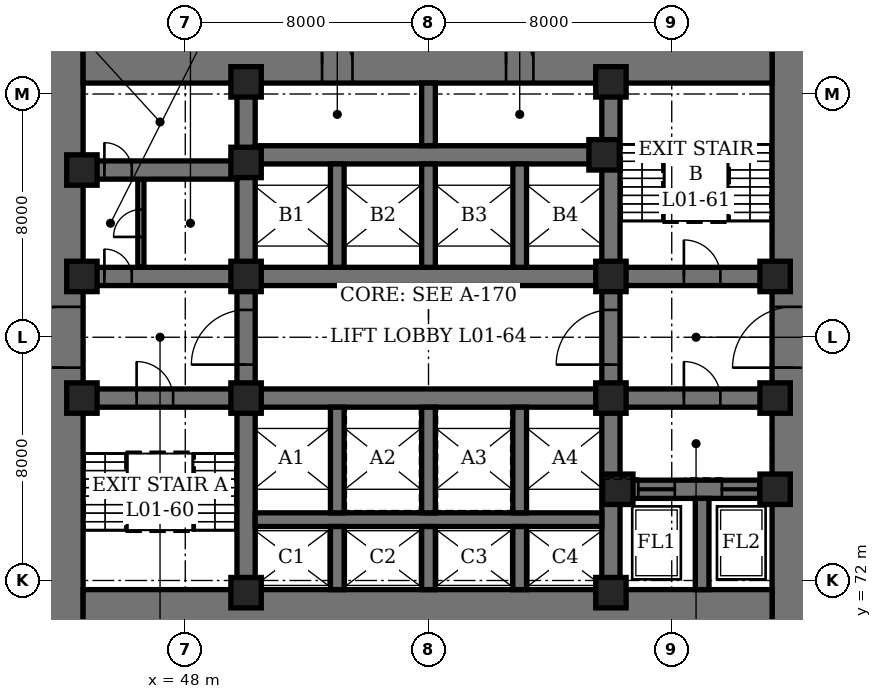
"""IFC4 building model, lengths in metres.
Left out: names, types, materials, properties, quantities, classifications, styles, units other than length and angle.
Written with IfcOpenShell. Run it as: python <this file> out.ifc"""

import sys

from ifc_helpers import new_model, si_unit, direction, frame, frame_2d, origin, origin_2d, place, context, subcontext, project, spatial, rectangle, hollow_rectangle, extrude, element, fill, save


model = new_model("IFC4")
c1 = context("Model", 3, precision=1e-05, world=origin(), true_north=direction((0.0, 1.0)))
c2 = subcontext(c1, "Body", "Model", "MODEL_VIEW")
j1 = project(units=[si_unit("LENGTHUNIT", "METRE"), si_unit("PLANEANGLEUNIT", "RADIAN")], contexts=[c1])
p1 = place(None, origin())
s1 = spatial("IfcSite", under=j1, at=p1, CompositionType="ELEMENT")
p2 = place(p1, origin())
s2 = spatial("IfcBuilding", under=s1, at=p2, CompositionType="ELEMENT")
p3 = place(p2, frame((0.0, 0.0, 4.9)))
s3 = spatial("IfcBuildingStorey", under=s2, at=p3, CompositionType="ELEMENT", Elevation=4.9)
p4 = place(p3, frame((44.0, 70.3, 0.0), z_axis=(0.0, 0.0, 1.0), x_axis=(0.0, 1.0, 0.0)))
e1 = element("IfcWall", 1, at=p4, inside=s3, PredefinedType="SHEAR", context=c2, shape_type="SweptSolid", body=[
    extrude(rectangle(XDim=19.34, YDim=1.28, at=frame_2d((9.67, 0.0))), origin(), (0.0, 0.0, 1.0), 5.0),
])
p5 = place(p4, frame((8.7, 0.0, 0.0)))
e2 = element("IfcOpeningElement", 2, at=p5, cuts=e1, PredefinedType="OPENING", context=c2, shape_type="SweptSolid", body=[
    extrude(rectangle(XDim=2.0, YDim=2.4, at=frame_2d((1.0, 1.2))), frame((0.0, 0.65, 0.0), z_axis=(0.0, -1.0, 0.0), x_axis=(1.0, 0.0, 0.0)), (0.0, 0.0, 1.0), 1.3),
])
p6 = place(p3, frame((68.0, 70.3, 0.0), z_axis=(0.0, 0.0, 1.0), x_axis=(0.0, 1.0, 0.0)))
e3 = element("IfcWall", 3, at=p6, inside=s3, PredefinedType="SHEAR", context=c2, shape_type="SweptSolid", body=[
    extrude(rectangle(XDim=19.34, YDim=1.4, at=frame_2d((9.67, 0.0))), origin(), (0.0, 0.0, 1.0), 5.0),
])
p7 = place(p6, frame((8.7, 0.0, 0.0)))
e4 = element("IfcOpeningElement", 4, at=p7, cuts=e3, PredefinedType="OPENING", context=c2, shape_type="SweptSolid", body=[
    extrude(rectangle(XDim=2.0, YDim=2.4, at=frame_2d((1.0, 1.2))), frame((0.0, 0.71, 0.0), z_axis=(0.0, -1.0, 0.0), x_axis=(1.0, 0.0, 0.0)), (0.0, 0.0, 1.0), 1.42),
])
p8 = place(p3, frame((44.64, 71.0, 0.0), z_axis=(0.0, 0.0, 1.0), x_axis=(1.0, 0.0, 0.0)))
e5 = element("IfcWall", 5, at=p8, inside=s3, PredefinedType="SHEAR", context=c2, shape_type="SweptSolid", body=[
    extrude(rectangle(XDim=22.66, YDim=1.4, at=frame_2d((11.33, 0.0))), origin(), (0.0, 0.0, 1.0), 5.0),
])
p9 = place(p3, frame((44.64, 89.0, 0.0), z_axis=(0.0, 0.0, 1.0), x_axis=(1.0, 0.0, 0.0)))
e6 = element("IfcWall", 6, at=p9, inside=s3, PredefinedType="SHEAR", context=c2, shape_type="SweptSolid", body=[
    extrude(rectangle(XDim=22.66, YDim=1.28, at=frame_2d((11.33, 0.0))), origin(), (0.0, 0.0, 1.0), 5.0),
])
p10 = place(p9, frame((7.86, 0.0, 0.0)))
e7 = element("IfcOpeningElement", 7, at=p10, cuts=e6, PredefinedType="OPENING", context=c2, shape_type="SweptSolid", body=[
    extrude(rectangle(XDim=1.0, YDim=2.1, at=frame_2d((0.5, 1.05))), frame((0.0, 0.65, 0.0), z_axis=(0.0, -1.0, 0.0), x_axis=(1.0, 0.0, 0.0)), (0.0, 0.0, 1.0), 1.3),
])
p11 = place(p9, frame((13.91, 0.0, 0.0)))
e8 = element("IfcOpeningElement", 8, at=p11, cuts=e6, PredefinedType="OPENING", context=c2, shape_type="SweptSolid", body=[
    extrude(rectangle(XDim=0.9, YDim=2.1, at=frame_2d((0.45, 1.05))), frame((0.0, 0.65, 0.0), z_axis=(0.0, -1.0, 0.0), x_axis=(1.0, 0.0, 0.0)), (0.0, 0.0, 1.0), 1.3),
])
p12 = place(p3, frame((50.0, 71.7, 0.0), z_axis=(0.0, 0.0, 1.0), x_axis=(0.0, 1.0, 0.0)))
e9 = element("IfcWall", 9, at=p12, inside=s3, PredefinedType="SHEAR", context=c2, shape_type="SweptSolid", body=[
    extrude(rectangle(XDim=16.66, YDim=0.6, at=frame_2d((8.33, 0.0))), origin(), (0.0, 0.0, 1.0), 5.0),
])
p13 = place(p12, frame((7.4, 0.0, 0.0)))
e10 = element("IfcOpeningElement", 10, at=p13, cuts=e9, PredefinedType="OPENING", context=c2, shape_type="SweptSolid", body=[
    extrude(rectangle(XDim=1.8, YDim=2.4, at=frame_2d((0.9, 1.2))), frame((0.0, 0.31, 0.0), z_axis=(0.0, -1.0, 0.0), x_axis=(1.0, 0.0, 0.0)), (0.0, 0.0, 1.0), 0.62),
])
p14 = place(p3, frame((62.0, 71.7, 0.0), z_axis=(0.0, 0.0, 1.0), x_axis=(0.0, 1.0, 0.0)))
e11 = element("IfcWall", 11, at=p14, inside=s3, PredefinedType="SHEAR", context=c2, shape_type="SweptSolid", body=[
    extrude(rectangle(XDim=16.66, YDim=0.6, at=frame_2d((8.33, 0.0))), origin(), (0.0, 0.0, 1.0), 5.0),
])
p15 = place(p14, frame((7.4, 0.0, 0.0)))
e12 = element("IfcOpeningElement", 12, at=p15, cuts=e11, PredefinedType="OPENING", context=c2, shape_type="SweptSolid", body=[
    extrude(rectangle(XDim=1.8, YDim=2.4, at=frame_2d((0.9, 1.2))), frame((0.0, 0.31, 0.0), z_axis=(0.0, -1.0, 0.0), x_axis=(1.0, 0.0, 0.0)), (0.0, 0.0, 1.0), 0.62),
])
p16 = place(p3, frame((44.64, 78.0, 0.0), z_axis=(0.0, 0.0, 1.0), x_axis=(1.0, 0.0, 0.0)))
e13 = element("IfcWall", 13, at=p16, inside=s3, PredefinedType="SHEAR", context=c2, shape_type="SweptSolid", body=[
    extrude(rectangle(XDim=5.06, YDim=0.6, at=frame_2d((2.53, 0.0))), origin(), (0.0, 0.0, 1.0), 5.0),
])
p17 = place(p16, frame((1.76, 0.0, 0.0)))
e14 = element("IfcOpeningElement", 14, at=p17, cuts=e13, PredefinedType="OPENING", context=c2, shape_type="SweptSolid", body=[
    extrude(rectangle(XDim=1.2, YDim=2.1, at=frame_2d((0.6, 1.05))), frame((0.0, 0.31, 0.0), z_axis=(0.0, -1.0, 0.0), x_axis=(1.0, 0.0, 0.0)), (0.0, 0.0, 1.0), 0.62),
])
p18 = place(p3, frame((44.64, 82.0, 0.0), z_axis=(0.0, 0.0, 1.0), x_axis=(1.0, 0.0, 0.0)))
e15 = element("IfcWall", 15, at=p18, inside=s3, PredefinedType="SHEAR", context=c2, shape_type="SweptSolid", body=[
    extrude(rectangle(XDim=5.06, YDim=0.6, at=frame_2d((2.53, 0.0))), origin(), (0.0, 0.0, 1.0), 5.0),
])
p19 = place(p18, frame((0.7, 0.0, 0.0)))
e16 = element("IfcOpeningElement", 16, at=p19, cuts=e15, PredefinedType="OPENING", context=c2, shape_type="SweptSolid", body=[
    extrude(rectangle(XDim=0.9, YDim=2.1, at=frame_2d((0.45, 1.05))), frame((0.0, 0.31, 0.0), z_axis=(0.0, -1.0, 0.0), x_axis=(1.0, 0.0, 0.0)), (0.0, 0.0, 1.0), 0.62),
])
p20 = place(p3, frame((44.64, 85.5, 0.0), z_axis=(0.0, 0.0, 1.0), x_axis=(1.0, 0.0, 0.0)))
e17 = element("IfcWall", 17, at=p20, inside=s3, PredefinedType="SHEAR", context=c2, shape_type="SweptSolid", body=[
    extrude(rectangle(XDim=5.06, YDim=0.6, at=frame_2d((2.53, 0.0))), origin(), (0.0, 0.0, 1.0), 5.0),
])
p21 = place(p20, frame((0.7, 0.0, 0.0)))
e18 = element("IfcOpeningElement", 18, at=p21, cuts=e17, PredefinedType="OPENING", context=c2, shape_type="SweptSolid", body=[
    extrude(rectangle(XDim=0.9, YDim=2.1, at=frame_2d((0.45, 1.05))), frame((0.0, 0.31, 0.0), z_axis=(0.0, -1.0, 0.0), x_axis=(1.0, 0.0, 0.0)), (0.0, 0.0, 1.0), 0.62),
])
p22 = place(p3, frame((62.3, 75.0, 0.0), z_axis=(0.0, 0.0, 1.0), x_axis=(1.0, 0.0, 0.0)))
e19 = element("IfcWall", 19, at=p22, inside=s3, PredefinedType="SHEAR", context=c2, shape_type="SweptSolid", body=[
    extrude(rectangle(XDim=5.0, YDim=0.6, at=frame_2d((2.5, 0.0))), origin(), (0.0, 0.0, 1.0), 5.0),
])
p23 = place(p22, frame((0.6, 0.0, 0.0)))
e20 = element("IfcOpeningElement", 20, at=p23, cuts=e19, PredefinedType="OPENING", context=c2, shape_type="SweptSolid", body=[
    extrude(rectangle(XDim=1.2, YDim=2.2, at=frame_2d((0.6, 1.1))), frame((0.0, 0.31, 0.0), z_axis=(0.0, -1.0, 0.0), x_axis=(1.0, 0.0, 0.0)), (0.0, 0.0, 1.0), 0.62),
])
p24 = place(p22, frame((3.35, 0.0, 0.0)))
e21 = element("IfcOpeningElement", 21, at=p24, cuts=e19, PredefinedType="OPENING", context=c2, shape_type="SweptSolid", body=[
    extrude(rectangle(XDim=1.2, YDim=2.2, at=frame_2d((0.6, 1.1))), frame((0.0, 0.31, 0.0), z_axis=(0.0, -1.0, 0.0), x_axis=(1.0, 0.0, 0.0)), (0.0, 0.0, 1.0), 0.62),
])
p25 = place(p3, frame((62.3, 78.0, 0.0), z_axis=(0.0, 0.0, 1.0), x_axis=(1.0, 0.0, 0.0)))
e22 = element("IfcWall", 22, at=p25, inside=s3, PredefinedType="SHEAR", context=c2, shape_type="SweptSolid", body=[
    extrude(rectangle(XDim=5.0, YDim=0.6, at=frame_2d((2.5, 0.0))), origin(), (0.0, 0.0, 1.0), 5.0),
])
p26 = place(p25, frame((2.1, 0.0, 0.0)))
e23 = element("IfcOpeningElement", 23, at=p26, cuts=e22, PredefinedType="OPENING", context=c2, shape_type="SweptSolid", body=[
    extrude(rectangle(XDim=1.2, YDim=2.1, at=frame_2d((0.6, 1.05))), frame((0.0, 0.31, 0.0), z_axis=(0.0, -1.0, 0.0), x_axis=(1.0, 0.0, 0.0)), (0.0, 0.0, 1.0), 0.62),
])
p27 = place(p3, frame((62.3, 82.0, 0.0), z_axis=(0.0, 0.0, 1.0), x_axis=(1.0, 0.0, 0.0)))
e24 = element("IfcWall", 24, at=p27, inside=s3, PredefinedType="SHEAR", context=c2, shape_type="SweptSolid", body=[
    extrude(rectangle(XDim=5.0, YDim=0.6, at=frame_2d((2.5, 0.0))), origin(), (0.0, 0.0, 1.0), 5.0),
])
p28 = place(p27, frame((2.1, 0.0, 0.0)))
e25 = element("IfcOpeningElement", 25, at=p28, cuts=e24, PredefinedType="OPENING", context=c2, shape_type="SweptSolid", body=[
    extrude(rectangle(XDim=1.2, YDim=2.1, at=frame_2d((0.6, 1.05))), frame((0.0, 0.31, 0.0), z_axis=(0.0, -1.0, 0.0), x_axis=(1.0, 0.0, 0.0)), (0.0, 0.0, 1.0), 0.62),
])
for number, where, z_axis, x_axis in (
    (26, (50.3, 78.0, 0.0), (0.0, 0.0, 1.0), (1.0, 0.0, 0.0)),
    (27, (50.3, 82.0, 0.0), (0.0, 0.0, 1.0), (1.0, 0.0, 0.0)),
    (28, (50.3, 86.0, 0.0), (0.0, 0.0, 1.0), (1.0, 0.0, 0.0)),
):
    element("IfcWall", number, at=place(p3, frame(where, z_axis=z_axis, x_axis=x_axis)), inside=s3, PredefinedType="SHEAR", context=c2, shape_type="SweptSolid", body=[
        extrude(rectangle(XDim=11.4, YDim=0.6, at=frame_2d((5.7, 0.0))), origin(), (0.0, 0.0, 1.0), 5.0),
    ])
p29 = place(p3, frame((50.3, 74.0, 0.0), z_axis=(0.0, 0.0, 1.0), x_axis=(1.0, 0.0, 0.0)))
e29 = element("IfcWall", 29, at=p29, inside=s3, PredefinedType="SHEAR", context=c2, shape_type="SweptSolid", body=[
    extrude(rectangle(XDim=11.4, YDim=0.45, at=frame_2d((5.7, 0.0))), origin(), (0.0, 0.0, 1.0), 5.0),
])
p30 = place(p3, frame((53.0, 71.7, 0.0), z_axis=(0.0, 0.0, 1.0), x_axis=(0.0, 1.0, 0.0)))
e30 = element("IfcWall", 30, at=p30, inside=s3, PredefinedType="SHEAR", context=c2, shape_type="SweptSolid", body=[
    extrude(rectangle(XDim=2.075, YDim=0.45, at=frame_2d((1.038, 0.0))), origin(), (0.0, 0.0, 1.0), 5.0),
])
p31 = place(p3, frame((53.0, 74.225, 0.0), z_axis=(0.0, 0.0, 1.0), x_axis=(0.0, 1.0, 0.0)))
e31 = element("IfcWall", 31, at=p31, inside=s3, PredefinedType="SHEAR", context=c2, shape_type="SweptSolid", body=[
    extrude(rectangle(XDim=3.475, YDim=0.45, at=frame_2d((1.737, 0.0))), origin(), (0.0, 0.0, 1.0), 5.0),
])
p32 = place(p3, frame((53.0, 82.3, 0.0), z_axis=(0.0, 0.0, 1.0), x_axis=(0.0, 1.0, 0.0)))
e32 = element("IfcWall", 32, at=p32, inside=s3, PredefinedType="SHEAR", context=c2, shape_type="SweptSolid", body=[
    extrude(rectangle(XDim=3.4, YDim=0.45, at=frame_2d((1.7, 0.0))), origin(), (0.0, 0.0, 1.0), 5.0),
])
p33 = place(p3, frame((56.0, 71.7, 0.0), z_axis=(0.0, 0.0, 1.0), x_axis=(0.0, 1.0, 0.0)))
e33 = element("IfcWall", 33, at=p33, inside=s3, PredefinedType="SHEAR", context=c2, shape_type="SweptSolid", body=[
    extrude(rectangle(XDim=2.075, YDim=0.45, at=frame_2d((1.038, 0.0))), origin(), (0.0, 0.0, 1.0), 5.0),
])
p34 = place(p3, frame((56.0, 74.225, 0.0), z_axis=(0.0, 0.0, 1.0), x_axis=(0.0, 1.0, 0.0)))
e34 = element("IfcWall", 34, at=p34, inside=s3, PredefinedType="SHEAR", context=c2, shape_type="SweptSolid", body=[
    extrude(rectangle(XDim=3.475, YDim=0.45, at=frame_2d((1.737, 0.0))), origin(), (0.0, 0.0, 1.0), 5.0),
])
p35 = place(p3, frame((56.0, 82.3, 0.0), z_axis=(0.0, 0.0, 1.0), x_axis=(0.0, 1.0, 0.0)))
e35 = element("IfcWall", 35, at=p35, inside=s3, PredefinedType="SHEAR", context=c2, shape_type="SweptSolid", body=[
    extrude(rectangle(XDim=3.4, YDim=0.45, at=frame_2d((1.7, 0.0))), origin(), (0.0, 0.0, 1.0), 5.0),
])
p36 = place(p3, frame((59.0, 71.7, 0.0), z_axis=(0.0, 0.0, 1.0), x_axis=(0.0, 1.0, 0.0)))
e36 = element("IfcWall", 36, at=p36, inside=s3, PredefinedType="SHEAR", context=c2, shape_type="SweptSolid", body=[
    extrude(rectangle(XDim=2.075, YDim=0.45, at=frame_2d((1.038, 0.0))), origin(), (0.0, 0.0, 1.0), 5.0),
])
p37 = place(p3, frame((59.0, 74.225, 0.0), z_axis=(0.0, 0.0, 1.0), x_axis=(0.0, 1.0, 0.0)))
e37 = element("IfcWall", 37, at=p37, inside=s3, PredefinedType="SHEAR", context=c2, shape_type="SweptSolid", body=[
    extrude(rectangle(XDim=3.475, YDim=0.45, at=frame_2d((1.737, 0.0))), origin(), (0.0, 0.0, 1.0), 5.0),
])
p38 = place(p3, frame((59.0, 82.3, 0.0), z_axis=(0.0, 0.0, 1.0), x_axis=(0.0, 1.0, 0.0)))
e38 = element("IfcWall", 38, at=p38, inside=s3, PredefinedType="SHEAR", context=c2, shape_type="SweptSolid", body=[
    extrude(rectangle(XDim=3.4, YDim=0.45, at=frame_2d((1.7, 0.0))), origin(), (0.0, 0.0, 1.0), 5.0),
])
p39 = place(p3, frame((65.0, 71.7, 0.0), z_axis=(0.0, 0.0, 1.0), x_axis=(0.0, 1.0, 0.0)))
e39 = element("IfcWall", 39, at=p39, inside=s3, PredefinedType="SHEAR", context=c2, shape_type="SweptSolid", body=[
    extrude(rectangle(XDim=3.0, YDim=0.45, at=frame_2d((1.5, 0.0))), origin(), (0.0, 0.0, 1.0), 5.0),
])
p40 = place(p3, frame((56.0, 86.3, 0.0), z_axis=(0.0, 0.0, 1.0), x_axis=(0.0, 1.0, 0.0)))
e40 = element("IfcWall", 40, at=p40, inside=s3, PredefinedType="SHEAR", context=c2, shape_type="SweptSolid", body=[
    extrude(rectangle(XDim=2.06, YDim=0.45, at=frame_2d((1.03, 0.0))), origin(), (0.0, 0.0, 1.0), 5.0),
])
for number, where, z_axis, x_axis in (
    (41, (44.6, 78.0, 0.0), (0.0, 0.0, 1.0), (1.0, 0.0, 0.0)),
    (42, (44.6, 82.0, 0.0), (0.0, 0.0, 1.0), (1.0, 0.0, 0.0)),
    (43, (44.6, 85.5, 0.0), (0.0, 0.0, 1.0), (1.0, 0.0, 0.0)),
    (44, (50.0, 71.6, 0.0), (0.0, 0.0, 1.0), (1.0, 0.0, 0.0)),
    (45, (50.0, 78.0, 0.0), (0.0, 0.0, 1.0), (1.0, 0.0, 0.0)),
    (46, (50.0, 82.0, 0.0), (0.0, 0.0, 1.0), (1.0, 0.0, 0.0)),
    (47, (50.0, 85.75, 0.0), (0.0, 0.0, 1.0), (1.0, 0.0, 0.0)),
    (48, (50.0, 88.4, 0.0), (0.0, 0.0, 1.0), (1.0, 0.0, 0.0)),
    (49, (61.775, 86.0, 0.0), (0.0, 0.0, 1.0), (1.0, 0.0, 0.0)),
    (50, (62.0, 71.6, 0.0), (0.0, 0.0, 1.0), (1.0, 0.0, 0.0)),
    (51, (62.0, 78.0, 0.0), (0.0, 0.0, 1.0), (1.0, 0.0, 0.0)),
    (52, (62.0, 82.0, 0.0), (0.0, 0.0, 1.0), (1.0, 0.0, 0.0)),
    (53, (62.0, 88.4, 0.0), (0.0, 0.0, 1.0), (1.0, 0.0, 0.0)),
    (54, (62.225, 75.0, 0.0), (0.0, 0.0, 1.0), (1.0, 0.0, 0.0)),
    (55, (67.4, 75.0, 0.0), (0.0, 0.0, 1.0), (1.0, 0.0, 0.0)),
    (56, (67.4, 78.0, 0.0), (0.0, 0.0, 1.0), (1.0, 0.0, 0.0)),
    (57, (67.4, 82.0, 0.0), (0.0, 0.0, 1.0), (1.0, 0.0, 0.0)),
):
    element("IfcColumn", number, at=place(p3, frame(where, z_axis=z_axis, x_axis=x_axis)), inside=s3, PredefinedType="COLUMN", context=c2, shape_type="SweptSolid", body=[
        extrude(hollow_rectangle(XDim=1.0, YDim=1.0, WallThickness=0.15, at=origin_2d()), origin(), (0.0, 0.0, 1.0), 5.0),
    ])
p41 = place(p3, frame((46.54, 82.3, 0.0), z_axis=(0.0, 0.0, 1.0), x_axis=(0.0, 1.0, 0.0)))
e58 = element("IfcWall", 58, at=p41, inside=s3, PredefinedType="PARTITIONING", context=c2, shape_type="SweptSolid", body=[
    extrude(rectangle(XDim=2.9, YDim=0.2, at=frame_2d((1.45, 0.0))), origin(), (0.0, 0.0, 1.0), 4.8),
])
p42 = place(p41, frame((1.0, 0.0, 0.0)))
e59 = element("IfcOpeningElement", 59, at=p42, cuts=e58, PredefinedType="OPENING", context=c2, shape_type="SweptSolid", body=[
    extrude(rectangle(XDim=0.9, YDim=2.1, at=frame_2d((0.45, 1.05))), frame((0.0, 0.11, 0.0), z_axis=(0.0, -1.0, 0.0), x_axis=(1.0, 0.0, 0.0)), (0.0, 0.0, 1.0), 0.22),
])
p43 = place(p19, origin())
e60 = element("IfcDoor", 60, at=p43, inside=s3, OperationType="SINGLE_SWING_LEFT", PredefinedType="DOOR", context=c2, shape_type="SweptSolid", body=[
    extrude(rectangle(XDim=0.9, YDim=2.1, at=frame_2d((0.45, 1.05))), frame((0.0, 0.3, 0.0), z_axis=(0.0, -1.0, 0.0), x_axis=(1.0, 0.0, 0.0)), (0.0, 0.0, 1.0), 0.6),
])
fill(e16, e60)
p44 = place(p42, origin())
e61 = element("IfcDoor", 61, at=p44, inside=s3, OperationType="SINGLE_SWING_RIGHT", PredefinedType="DOOR", context=c2, shape_type="SweptSolid", body=[
    extrude(rectangle(XDim=0.9, YDim=2.1, at=frame_2d((0.45, 1.05))), frame((0.0, 0.1, 0.0), z_axis=(0.0, -1.0, 0.0), x_axis=(1.0, 0.0, 0.0)), (0.0, 0.0, 1.0), 0.199),
])
fill(e59, e61)
p45 = place(p21, origin())
e62 = element("IfcDoor", 62, at=p45, inside=s3, OperationType="SINGLE_SWING_RIGHT", PredefinedType="DOOR", context=c2, shape_type="SweptSolid", body=[
    extrude(rectangle(XDim=0.9, YDim=2.1, at=frame_2d((0.45, 1.05))), frame((0.0, 0.3, 0.0), z_axis=(0.0, -1.0, 0.0), x_axis=(1.0, 0.0, 0.0)), (0.0, 0.0, 1.0), 0.6),
])
fill(e18, e62)
p46 = place(p10, origin())
e63 = element("IfcDoor", 63, at=p46, inside=s3, OperationType="SINGLE_SWING_LEFT", PredefinedType="DOOR", context=c2, shape_type="SweptSolid", body=[
    extrude(rectangle(XDim=1.0, YDim=2.1, at=frame_2d((0.5, 1.05))), frame((0.0, 0.35, 0.0), z_axis=(0.0, -1.0, 0.0), x_axis=(1.0, 0.0, 0.0)), (0.0, 0.0, 1.0), 0.7),
])
fill(e7, e63)
p47 = place(p11, origin())
e64 = element("IfcDoor", 64, at=p47, inside=s3, OperationType="SINGLE_SWING_LEFT", PredefinedType="DOOR", context=c2, shape_type="SweptSolid", body=[
    extrude(rectangle(XDim=0.9, YDim=2.1, at=frame_2d((0.45, 1.05))), frame((0.0, 0.35, 0.0), z_axis=(0.0, -1.0, 0.0), x_axis=(1.0, 0.0, 0.0)), (0.0, 0.0, 1.0), 0.7),
])
fill(e8, e64)
p48 = place(p17, origin())
e65 = element("IfcDoor", 65, at=p48, inside=s3, OperationType="SINGLE_SWING_LEFT", PredefinedType="DOOR", context=c2, shape_type="SweptSolid", body=[
    extrude(rectangle(XDim=1.2, YDim=2.1, at=frame_2d((0.6, 1.05))), frame((0.0, 0.3, 0.0), z_axis=(0.0, -1.0, 0.0), x_axis=(1.0, 0.0, 0.0)), (0.0, 0.0, 1.0), 0.6),
])
fill(e14, e65)
p49 = place(p28, origin())
e66 = element("IfcDoor", 66, at=p49, inside=s3, OperationType="SINGLE_SWING_LEFT", PredefinedType="DOOR", context=c2, shape_type="SweptSolid", body=[
    extrude(rectangle(XDim=1.2, YDim=2.1, at=frame_2d((0.6, 1.05))), frame((0.0, 0.3, 0.0), z_axis=(0.0, -1.0, 0.0), x_axis=(1.0, 0.0, 0.0)), (0.0, 0.0, 1.0), 0.6),
])
fill(e25, e66)
p50 = place(p5, origin())
e67 = element("IfcDoor", 67, at=p50, inside=s3, OperationType="DOUBLE_DOOR_SINGLE_SWING", PredefinedType="DOOR", context=c2, shape_type="SweptSolid", body=[
    extrude(rectangle(XDim=2.0, YDim=2.4, at=frame_2d((1.0, 1.2))), frame((0.0, 0.35, 0.0), z_axis=(0.0, -1.0, 0.0), x_axis=(1.0, 0.0, 0.0)), (0.0, 0.0, 1.0), 0.7),
])
fill(e2, e67)
p51 = place(p7, origin())
e68 = element("IfcDoor", 68, at=p51, inside=s3, OperationType="DOUBLE_DOOR_SINGLE_SWING", PredefinedType="DOOR", context=c2, shape_type="SweptSolid", body=[
    extrude(rectangle(XDim=2.0, YDim=2.4, at=frame_2d((1.0, 1.2))), frame((0.0, 0.35, 0.0), z_axis=(0.0, -1.0, 0.0), x_axis=(1.0, 0.0, 0.0)), (0.0, 0.0, 1.0), 0.7),
])
fill(e4, e68)
p52 = place(p13, origin())
e69 = element("IfcDoor", 69, at=p52, inside=s3, OperationType="DOUBLE_DOOR_SINGLE_SWING", PredefinedType="DOOR", context=c2, shape_type="SweptSolid", body=[
    extrude(rectangle(XDim=1.8, YDim=2.4, at=frame_2d((0.9, 1.2))), frame((0.0, 0.3, 0.0), z_axis=(0.0, -1.0, 0.0), x_axis=(1.0, 0.0, 0.0)), (0.0, 0.0, 1.0), 0.6),
])
fill(e10, e69)
p53 = place(p15, origin())
e70 = element("IfcDoor", 70, at=p53, inside=s3, OperationType="DOUBLE_DOOR_SINGLE_SWING", PredefinedType="DOOR", context=c2, shape_type="SweptSolid", body=[
    extrude(rectangle(XDim=1.8, YDim=2.4, at=frame_2d((0.9, 1.2))), frame((0.0, 0.3, 0.0), z_axis=(0.0, -1.0, 0.0), x_axis=(1.0, 0.0, 0.0)), (0.0, 0.0, 1.0), 0.6),
])
fill(e12, e70)
p54 = place(p26, origin())
e71 = element("IfcDoor", 71, at=p54, inside=s3, OperationType="SINGLE_SWING_RIGHT", PredefinedType="DOOR", context=c2, shape_type="SweptSolid", body=[
    extrude(rectangle(XDim=1.2, YDim=2.1, at=frame_2d((0.6, 1.05))), frame((0.0, 0.3, 0.0), z_axis=(0.0, -1.0, 0.0), x_axis=(1.0, 0.0, 0.0)), (0.0, 0.0, 1.0), 0.6),
])
fill(e23, e71)
p55 = place(p23, origin())
e72 = element("IfcDoor", 72, at=p55, inside=s3, OperationType="SLIDING_TO_LEFT", PredefinedType="DOOR", context=c2, shape_type="SweptSolid", body=[
    extrude(rectangle(XDim=1.2, YDim=2.2, at=frame_2d((0.6, 1.1))), frame((0.0, 0.3, 0.0), z_axis=(0.0, -1.0, 0.0), x_axis=(1.0, 0.0, 0.0)), (0.0, 0.0, 1.0), 0.6),
])
fill(e20, e72)
p56 = place(p24, origin())
e73 = element("IfcDoor", 73, at=p56, inside=s3, OperationType="SLIDING_TO_LEFT", PredefinedType="DOOR", context=c2, shape_type="SweptSolid", body=[
    extrude(rectangle(XDim=1.2, YDim=2.2, at=frame_2d((0.6, 1.1))), frame((0.0, 0.3, 0.0), z_axis=(0.0, -1.0, 0.0), x_axis=(1.0, 0.0, 0.0)), (0.0, 0.0, 1.0), 0.6),
])
fill(e21, e73)
save(model, sys.argv[1])
